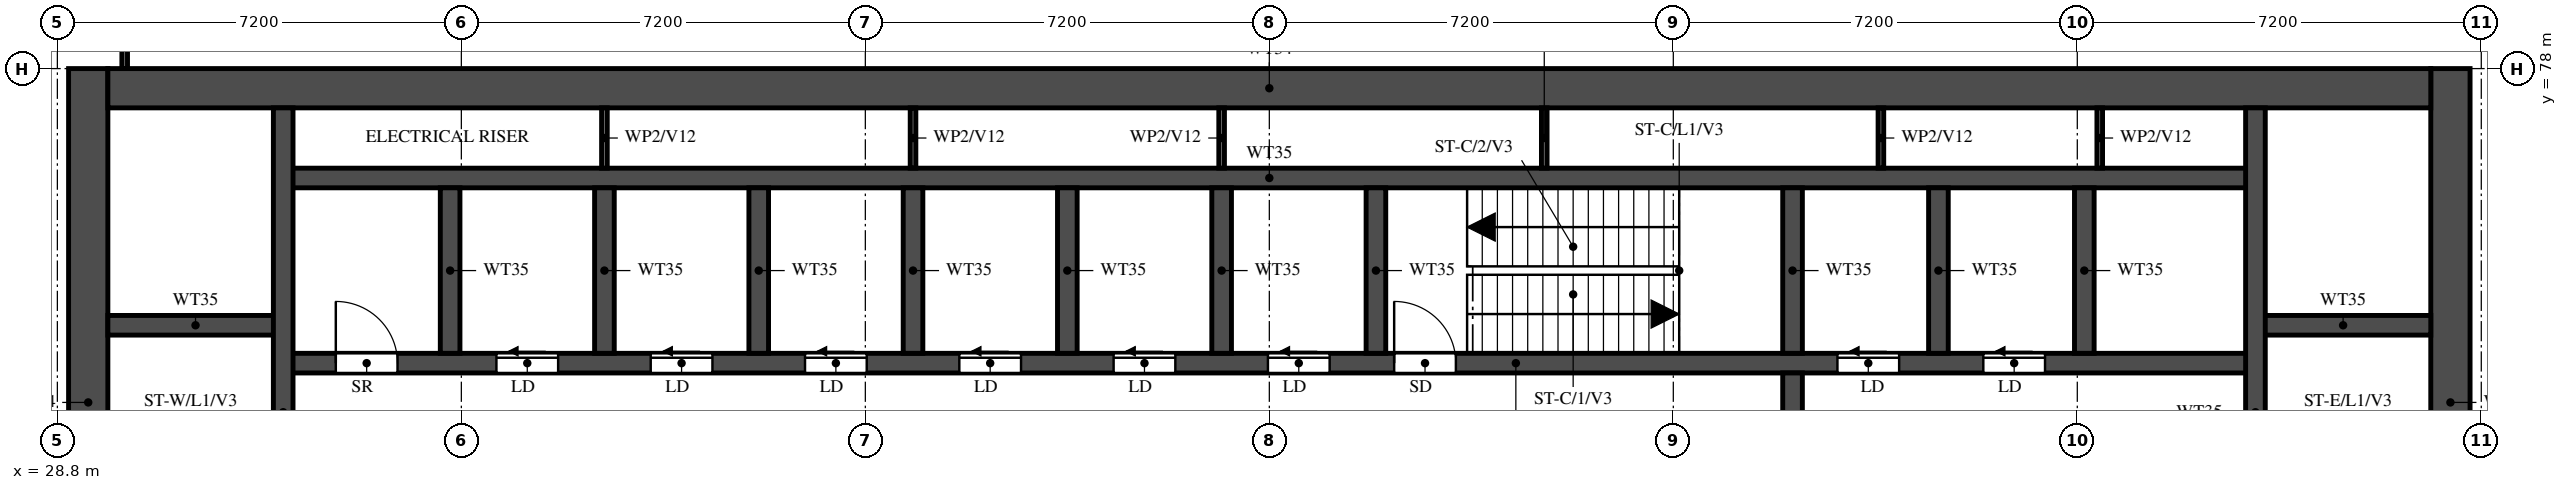
"""IFC4 building model, lengths in metres.
Left out: names, types, materials, properties, quantities, classifications, styles, units other than length and angle.
Written with IfcOpenShell. Run it as: python <this file> out.ifc"""

import sys

from ifc_helpers import new_model, si_unit, direction, frame, frame_2d, origin, place, context, subcontext, project, spatial, rectangle, extrude, element, fill, save


model = new_model("IFC4")
c1 = context("Model", 3, precision=1e-05, world=origin(), true_north=direction((0.0, 1.0)))
c2 = subcontext(c1, "Body", "Model", "MODEL_VIEW")
j1 = project(units=[si_unit("LENGTHUNIT", "METRE"), si_unit("PLANEANGLEUNIT", "RADIAN")], contexts=[c1])
p1 = place(None, origin())
s1 = spatial("IfcSite", under=j1, at=p1, CompositionType="ELEMENT")
p2 = place(p1, origin())
s2 = spatial("IfcBuilding", under=s1, at=p2, CompositionType="ELEMENT")
p3 = place(p2, frame((0.0, 0.0, 206.0)))
s3 = spatial("IfcBuildingStorey", under=s2, at=p3, CompositionType="ELEMENT", Elevation=206.0)
for number, where, z_axis, x_axis in (
    (1, (29.35, 66.1, 0.0), (0.0, 0.0, 1.0), (0.0, 1.0, 0.0)),
    (2, (71.45, 66.1, 0.0), (0.0, 0.0, 1.0), (0.0, 1.0, 0.0)),
):
    element("IfcWall", number, at=place(p3, frame(where, z_axis=z_axis, x_axis=x_axis)), inside=s3, PredefinedType="SHEAR", context=c2, shape_type="SweptSolid", body=[
        extrude(rectangle(XDim=11.9, YDim=0.7, at=frame_2d((5.95, 0.0))), origin(), (0.0, 0.0, 1.0), 5.22),
    ])
p4 = place(p3, frame((29.7, 77.65, 0.0), z_axis=(0.0, 0.0, 1.0), x_axis=(1.0, 0.0, 0.0)))
e3 = element("IfcWall", 3, at=p4, inside=s3, PredefinedType="SHEAR", context=c2, shape_type="SweptSolid", body=[
    extrude(rectangle(XDim=41.4, YDim=0.7, at=frame_2d((20.7, 0.0))), origin(), (0.0, 0.0, 1.0), 5.22),
])
p5 = place(p3, frame((32.825, 72.75, 0.0), z_axis=(0.0, 0.0, 1.0), x_axis=(1.0, 0.0, 0.0)))
e4 = element("IfcWall", 4, at=p5, inside=s3, PredefinedType="SHEAR", context=c2, shape_type="SweptSolid", body=[
    extrude(rectangle(XDim=35.15, YDim=0.35, at=frame_2d((17.575, 0.0))), origin(), (0.0, 0.0, 1.0), 5.22),
])
p6 = place(p5, frame((19.8, 0.0, 0.0)))
e5 = element("IfcOpeningElement", 5, at=p6, cuts=e4, PredefinedType="OPENING", context=c2, shape_type="SweptSolid", body=[
    extrude(rectangle(XDim=1.1, YDim=2.1, at=frame_2d((0.55, 1.05))), frame((0.0, 0.185, 0.0), z_axis=(0.0, -1.0, 0.0), x_axis=(1.0, 0.0, 0.0)), (0.0, 0.0, 1.0), 0.37),
])
p7 = place(p5, frame((27.7, 0.0, 0.0)))
e6 = element("IfcOpeningElement", 6, at=p7, cuts=e4, PredefinedType="OPENING", context=c2, shape_type="SweptSolid", body=[
    extrude(rectangle(XDim=1.1, YDim=2.1, at=frame_2d((0.55, 1.05))), frame((0.0, 0.185, 0.0), z_axis=(0.0, -1.0, 0.0), x_axis=(1.0, 0.0, 0.0)), (0.0, 0.0, 1.0), 0.37),
])
p8 = place(p5, frame((30.3, 0.0, 0.0)))
e7 = element("IfcOpeningElement", 7, at=p8, cuts=e4, PredefinedType="OPENING", context=c2, shape_type="SweptSolid", body=[
    extrude(rectangle(XDim=1.1, YDim=2.1, at=frame_2d((0.55, 1.05))), frame((0.0, 0.185, 0.0), z_axis=(0.0, -1.0, 0.0), x_axis=(1.0, 0.0, 0.0)), (0.0, 0.0, 1.0), 0.37),
])
p9 = place(p5, frame((3.8, 0.0, 0.0)))
e8 = element("IfcOpeningElement", 8, at=p9, cuts=e4, PredefinedType="OPENING", context=c2, shape_type="SweptSolid", body=[
    extrude(rectangle(XDim=1.1, YDim=2.1, at=frame_2d((0.55, 1.05))), frame((0.0, 0.185, 0.0), z_axis=(0.0, -1.0, 0.0), x_axis=(1.0, 0.0, 0.0)), (0.0, 0.0, 1.0), 0.37),
])
p10 = place(p5, frame((6.55, 0.0, 0.0)))
e9 = element("IfcOpeningElement", 9, at=p10, cuts=e4, PredefinedType="OPENING", context=c2, shape_type="SweptSolid", body=[
    extrude(rectangle(XDim=1.1, YDim=2.1, at=frame_2d((0.55, 1.05))), frame((0.0, 0.185, 0.0), z_axis=(0.0, -1.0, 0.0), x_axis=(1.0, 0.0, 0.0)), (0.0, 0.0, 1.0), 0.37),
])
p11 = place(p5, frame((9.3, 0.0, 0.0)))
e10 = element("IfcOpeningElement", 10, at=p11, cuts=e4, PredefinedType="OPENING", context=c2, shape_type="SweptSolid", body=[
    extrude(rectangle(XDim=1.1, YDim=2.1, at=frame_2d((0.55, 1.05))), frame((0.0, 0.185, 0.0), z_axis=(0.0, -1.0, 0.0), x_axis=(1.0, 0.0, 0.0)), (0.0, 0.0, 1.0), 0.37),
])
p12 = place(p5, frame((12.05, 0.0, 0.0)))
e11 = element("IfcOpeningElement", 11, at=p12, cuts=e4, PredefinedType="OPENING", context=c2, shape_type="SweptSolid", body=[
    extrude(rectangle(XDim=1.1, YDim=2.1, at=frame_2d((0.55, 1.05))), frame((0.0, 0.185, 0.0), z_axis=(0.0, -1.0, 0.0), x_axis=(1.0, 0.0, 0.0)), (0.0, 0.0, 1.0), 0.37),
])
p13 = place(p5, frame((14.8, 0.0, 0.0)))
e12 = element("IfcOpeningElement", 12, at=p13, cuts=e4, PredefinedType="OPENING", context=c2, shape_type="SweptSolid", body=[
    extrude(rectangle(XDim=1.1, YDim=2.1, at=frame_2d((0.55, 1.05))), frame((0.0, 0.185, 0.0), z_axis=(0.0, -1.0, 0.0), x_axis=(1.0, 0.0, 0.0)), (0.0, 0.0, 1.0), 0.37),
])
p14 = place(p5, frame((17.55, 0.0, 0.0)))
e13 = element("IfcOpeningElement", 13, at=p14, cuts=e4, PredefinedType="OPENING", context=c2, shape_type="SweptSolid", body=[
    extrude(rectangle(XDim=1.1, YDim=2.1, at=frame_2d((0.55, 1.05))), frame((0.0, 0.185, 0.0), z_axis=(0.0, -1.0, 0.0), x_axis=(1.0, 0.0, 0.0)), (0.0, 0.0, 1.0), 0.37),
])
p15 = place(p5, frame((0.938, 0.0, 0.0)))
e14 = element("IfcOpeningElement", 14, at=p15, cuts=e4, PredefinedType="OPENING", context=c2, shape_type="SweptSolid", body=[
    extrude(rectangle(XDim=1.1, YDim=2.1, at=frame_2d((0.55, 1.05))), frame((0.0, 0.185, 0.0), z_axis=(0.0, -1.0, 0.0), x_axis=(1.0, 0.0, 0.0)), (0.0, 0.0, 1.0), 0.37),
])
p16 = place(p3, frame((32.825, 76.05, 0.0), z_axis=(0.0, 0.0, 1.0), x_axis=(1.0, 0.0, 0.0)))
e15 = element("IfcWall", 15, at=p16, inside=s3, PredefinedType="SHEAR", context=c2, shape_type="SweptSolid", body=[
    extrude(rectangle(XDim=35.15, YDim=0.35, at=frame_2d((17.575, 0.0))), origin(), (0.0, 0.0, 1.0), 5.22),
])
for number, where, z_axis, x_axis in (
    (16, (29.7, 73.425, 0.0), (0.0, 0.0, 1.0), (1.0, 0.0, 0.0)),
    (17, (67.975, 73.425, 0.0), (0.0, 0.0, 1.0), (1.0, 0.0, 0.0)),
):
    element("IfcWall", number, at=place(p3, frame(where, z_axis=z_axis, x_axis=x_axis)), inside=s3, PredefinedType="SHEAR", context=c2, shape_type="SweptSolid", body=[
        extrude(rectangle(XDim=3.125, YDim=0.35, at=frame_2d((1.562, 0.0))), origin(), (0.0, 0.0, 1.0), 5.22),
    ])
p17 = place(p3, frame((32.825, 66.45, 0.0), z_axis=(0.0, 0.0, 1.0), x_axis=(0.0, 1.0, 0.0)))
e18 = element("IfcWall", 18, at=p17, inside=s3, PredefinedType="SHEAR", context=c2, shape_type="SweptSolid", body=[
    extrude(rectangle(XDim=10.85, YDim=0.35, at=frame_2d((5.425, 0.0))), origin(), (0.0, 0.0, 1.0), 5.22),
])
p18 = place(p3, frame((67.975, 66.45, 0.0), z_axis=(0.0, 0.0, 1.0), x_axis=(0.0, 1.0, 0.0)))
e19 = element("IfcWall", 19, at=p18, inside=s3, PredefinedType="SHEAR", context=c2, shape_type="SweptSolid", body=[
    extrude(rectangle(XDim=10.85, YDim=0.35, at=frame_2d((5.425, 0.0))), origin(), (0.0, 0.0, 1.0), 5.22),
])
p19 = place(p18, frame((0.15, 0.0, 0.0)))
e20 = element("IfcOpeningElement", 20, at=p19, cuts=e19, PredefinedType="OPENING", context=c2, shape_type="SweptSolid", body=[
    extrude(rectangle(XDim=1.1, YDim=2.1, at=frame_2d((0.55, 1.05))), frame((0.0, 0.185, 0.0), z_axis=(0.0, -1.0, 0.0), x_axis=(1.0, 0.0, 0.0)), (0.0, 0.0, 1.0), 0.37),
])
p20 = place(p3, frame((59.725, 66.45, 0.0), z_axis=(0.0, 0.0, 1.0), x_axis=(0.0, 1.0, 0.0)))
e21 = element("IfcWall", 21, at=p20, inside=s3, PredefinedType="SHEAR", context=c2, shape_type="SweptSolid", body=[
    extrude(rectangle(XDim=6.125, YDim=0.35, at=frame_2d((3.062, 0.0))), origin(), (0.0, 0.0, 1.0), 5.22),
])
p21 = place(p20, frame((3.85, 0.0, 0.0)))
e22 = element("IfcOpeningElement", 22, at=p21, cuts=e21, PredefinedType="OPENING", context=c2, shape_type="SweptSolid", body=[
    extrude(rectangle(XDim=1.2, YDim=2.1, at=frame_2d((0.6, 1.05))), frame((0.0, 0.185, 0.0), z_axis=(0.0, -1.0, 0.0), x_axis=(1.0, 0.0, 0.0)), (0.0, 0.0, 1.0), 0.37),
])
for number, where, z_axis, x_axis in (
    (23, (59.725, 72.925, 0.0), (0.0, 0.0, 1.0), (0.0, 1.0, 0.0)),
    (24, (35.8, 72.925, 0.0), (0.0, 0.0, 1.0), (0.0, 1.0, 0.0)),
    (25, (38.55, 72.925, 0.0), (0.0, 0.0, 1.0), (0.0, 1.0, 0.0)),
    (26, (41.3, 72.925, 0.0), (0.0, 0.0, 1.0), (0.0, 1.0, 0.0)),
    (27, (44.05, 72.925, 0.0), (0.0, 0.0, 1.0), (0.0, 1.0, 0.0)),
    (28, (46.8, 72.925, 0.0), (0.0, 0.0, 1.0), (0.0, 1.0, 0.0)),
    (29, (49.55, 72.925, 0.0), (0.0, 0.0, 1.0), (0.0, 1.0, 0.0)),
    (30, (52.3, 72.925, 0.0), (0.0, 0.0, 1.0), (0.0, 1.0, 0.0)),
    (31, (62.325, 72.925, 0.0), (0.0, 0.0, 1.0), (0.0, 1.0, 0.0)),
    (32, (64.925, 72.925, 0.0), (0.0, 0.0, 1.0), (0.0, 1.0, 0.0)),
):
    element("IfcWall", number, at=place(p3, frame(where, z_axis=z_axis, x_axis=x_axis)), inside=s3, PredefinedType="SHEAR", context=c2, shape_type="SweptSolid", body=[
        extrude(rectangle(XDim=2.95, YDim=0.35, at=frame_2d((1.475, 0.0))), origin(), (0.0, 0.0, 1.0), 5.22),
    ])
for number, where, z_axis, x_axis in (
    (33, (38.55, 76.225, 0.0), (0.0, 0.0, 1.0), (0.0, 1.0, 0.0)),
    (34, (44.05, 76.225, 0.0), (0.0, 0.0, 1.0), (0.0, 1.0, 0.0)),
    (35, (49.55, 76.225, 0.0), (0.0, 0.0, 1.0), (0.0, 1.0, 0.0)),
    (36, (55.3, 76.225, 0.0), (0.0, 0.0, 1.0), (0.0, 1.0, 0.0)),
    (37, (61.3, 76.225, 0.0), (0.0, 0.0, 1.0), (0.0, 1.0, 0.0)),
    (38, (65.2, 76.225, 0.0), (0.0, 0.0, 1.0), (0.0, 1.0, 0.0)),
):
    element("IfcWall", number, at=place(p3, frame(where, z_axis=z_axis, x_axis=x_axis)), inside=s3, PredefinedType="PARTITIONING", context=c2, shape_type="SweptSolid", body=[
        extrude(rectangle(XDim=1.075, YDim=0.1, at=frame_2d((0.538, 0.0))), origin(), (0.0, 0.0, 1.0), 5.22),
    ])
p22 = place(p3, frame((30.0, 78.002, 0.0), z_axis=(0.0, 0.0, 1.0), x_axis=(0.0, 1.0, 0.0)))
e39 = element("IfcWall", 39, at=p22, inside=s3, PredefinedType="PARTITIONING", context=c2, shape_type="SweptSolid", body=[
    extrude(rectangle(XDim=1.398, YDim=0.1, at=frame_2d((0.699, 0.0))), origin(), (0.0, 0.0, 1.0), 5.22),
])
p23 = place(p6, origin())
e40 = element("IfcDoor", 40, at=p23, inside=s3, OperationType="SINGLE_SWING_LEFT", PredefinedType="DOOR", context=c2, shape_type="SweptSolid", body=[
    extrude(rectangle(XDim=1.1, YDim=2.1, at=frame_2d((0.55, 1.05))), frame((0.0, 0.025, 0.0), z_axis=(0.0, -1.0, 0.0), x_axis=(1.0, 0.0, 0.0)), (0.0, 0.0, 1.0), 0.05),
])
fill(e5, e40)
p24 = place(p7, origin())
e41 = element("IfcDoor", 41, at=p24, inside=s3, OperationType="SLIDING_TO_LEFT", PredefinedType="DOOR", context=c2, shape_type="SweptSolid", body=[
    extrude(rectangle(XDim=1.1, YDim=2.1, at=frame_2d((0.55, 1.05))), frame((0.0, 0.025, 0.0), z_axis=(0.0, -1.0, 0.0), x_axis=(1.0, 0.0, 0.0)), (0.0, 0.0, 1.0), 0.05),
])
fill(e6, e41)
p25 = place(p8, origin())
e42 = element("IfcDoor", 42, at=p25, inside=s3, OperationType="SLIDING_TO_LEFT", PredefinedType="DOOR", context=c2, shape_type="SweptSolid", body=[
    extrude(rectangle(XDim=1.1, YDim=2.1, at=frame_2d((0.55, 1.05))), frame((0.0, 0.025, 0.0), z_axis=(0.0, -1.0, 0.0), x_axis=(1.0, 0.0, 0.0)), (0.0, 0.0, 1.0), 0.05),
])
fill(e7, e42)
p26 = place(p9, origin())
e43 = element("IfcDoor", 43, at=p26, inside=s3, OperationType="SLIDING_TO_LEFT", PredefinedType="DOOR", context=c2, shape_type="SweptSolid", body=[
    extrude(rectangle(XDim=1.1, YDim=2.1, at=frame_2d((0.55, 1.05))), frame((0.0, 0.025, 0.0), z_axis=(0.0, -1.0, 0.0), x_axis=(1.0, 0.0, 0.0)), (0.0, 0.0, 1.0), 0.05),
])
fill(e8, e43)
p27 = place(p10, origin())
e44 = element("IfcDoor", 44, at=p27, inside=s3, OperationType="SLIDING_TO_LEFT", PredefinedType="DOOR", context=c2, shape_type="SweptSolid", body=[
    extrude(rectangle(XDim=1.1, YDim=2.1, at=frame_2d((0.55, 1.05))), frame((0.0, 0.025, 0.0), z_axis=(0.0, -1.0, 0.0), x_axis=(1.0, 0.0, 0.0)), (0.0, 0.0, 1.0), 0.05),
])
fill(e9, e44)
p28 = place(p11, origin())
e45 = element("IfcDoor", 45, at=p28, inside=s3, OperationType="SLIDING_TO_LEFT", PredefinedType="DOOR", context=c2, shape_type="SweptSolid", body=[
    extrude(rectangle(XDim=1.1, YDim=2.1, at=frame_2d((0.55, 1.05))), frame((0.0, 0.025, 0.0), z_axis=(0.0, -1.0, 0.0), x_axis=(1.0, 0.0, 0.0)), (0.0, 0.0, 1.0), 0.05),
])
fill(e10, e45)
p29 = place(p12, origin())
e46 = element("IfcDoor", 46, at=p29, inside=s3, OperationType="SLIDING_TO_LEFT", PredefinedType="DOOR", context=c2, shape_type="SweptSolid", body=[
    extrude(rectangle(XDim=1.1, YDim=2.1, at=frame_2d((0.55, 1.05))), frame((0.0, 0.025, 0.0), z_axis=(0.0, -1.0, 0.0), x_axis=(1.0, 0.0, 0.0)), (0.0, 0.0, 1.0), 0.05),
])
fill(e11, e46)
p30 = place(p13, origin())
e47 = element("IfcDoor", 47, at=p30, inside=s3, OperationType="SLIDING_TO_LEFT", PredefinedType="DOOR", context=c2, shape_type="SweptSolid", body=[
    extrude(rectangle(XDim=1.1, YDim=2.1, at=frame_2d((0.55, 1.05))), frame((0.0, 0.025, 0.0), z_axis=(0.0, -1.0, 0.0), x_axis=(1.0, 0.0, 0.0)), (0.0, 0.0, 1.0), 0.05),
])
fill(e12, e47)
p31 = place(p14, origin())
e48 = element("IfcDoor", 48, at=p31, inside=s3, OperationType="SLIDING_TO_LEFT", PredefinedType="DOOR", context=c2, shape_type="SweptSolid", body=[
    extrude(rectangle(XDim=1.1, YDim=2.1, at=frame_2d((0.55, 1.05))), frame((0.0, 0.025, 0.0), z_axis=(0.0, -1.0, 0.0), x_axis=(1.0, 0.0, 0.0)), (0.0, 0.0, 1.0), 0.05),
])
fill(e13, e48)
p32 = place(p15, origin())
e49 = element("IfcDoor", 49, at=p32, inside=s3, OperationType="SINGLE_SWING_LEFT", PredefinedType="DOOR", context=c2, shape_type="SweptSolid", body=[
    extrude(rectangle(XDim=1.1, YDim=2.1, at=frame_2d((0.55, 1.05))), frame((0.0, 0.025, 0.0), z_axis=(0.0, -1.0, 0.0), x_axis=(1.0, 0.0, 0.0)), (0.0, 0.0, 1.0), 0.05),
])
fill(e14, e49)
save(model, sys.argv[1])
